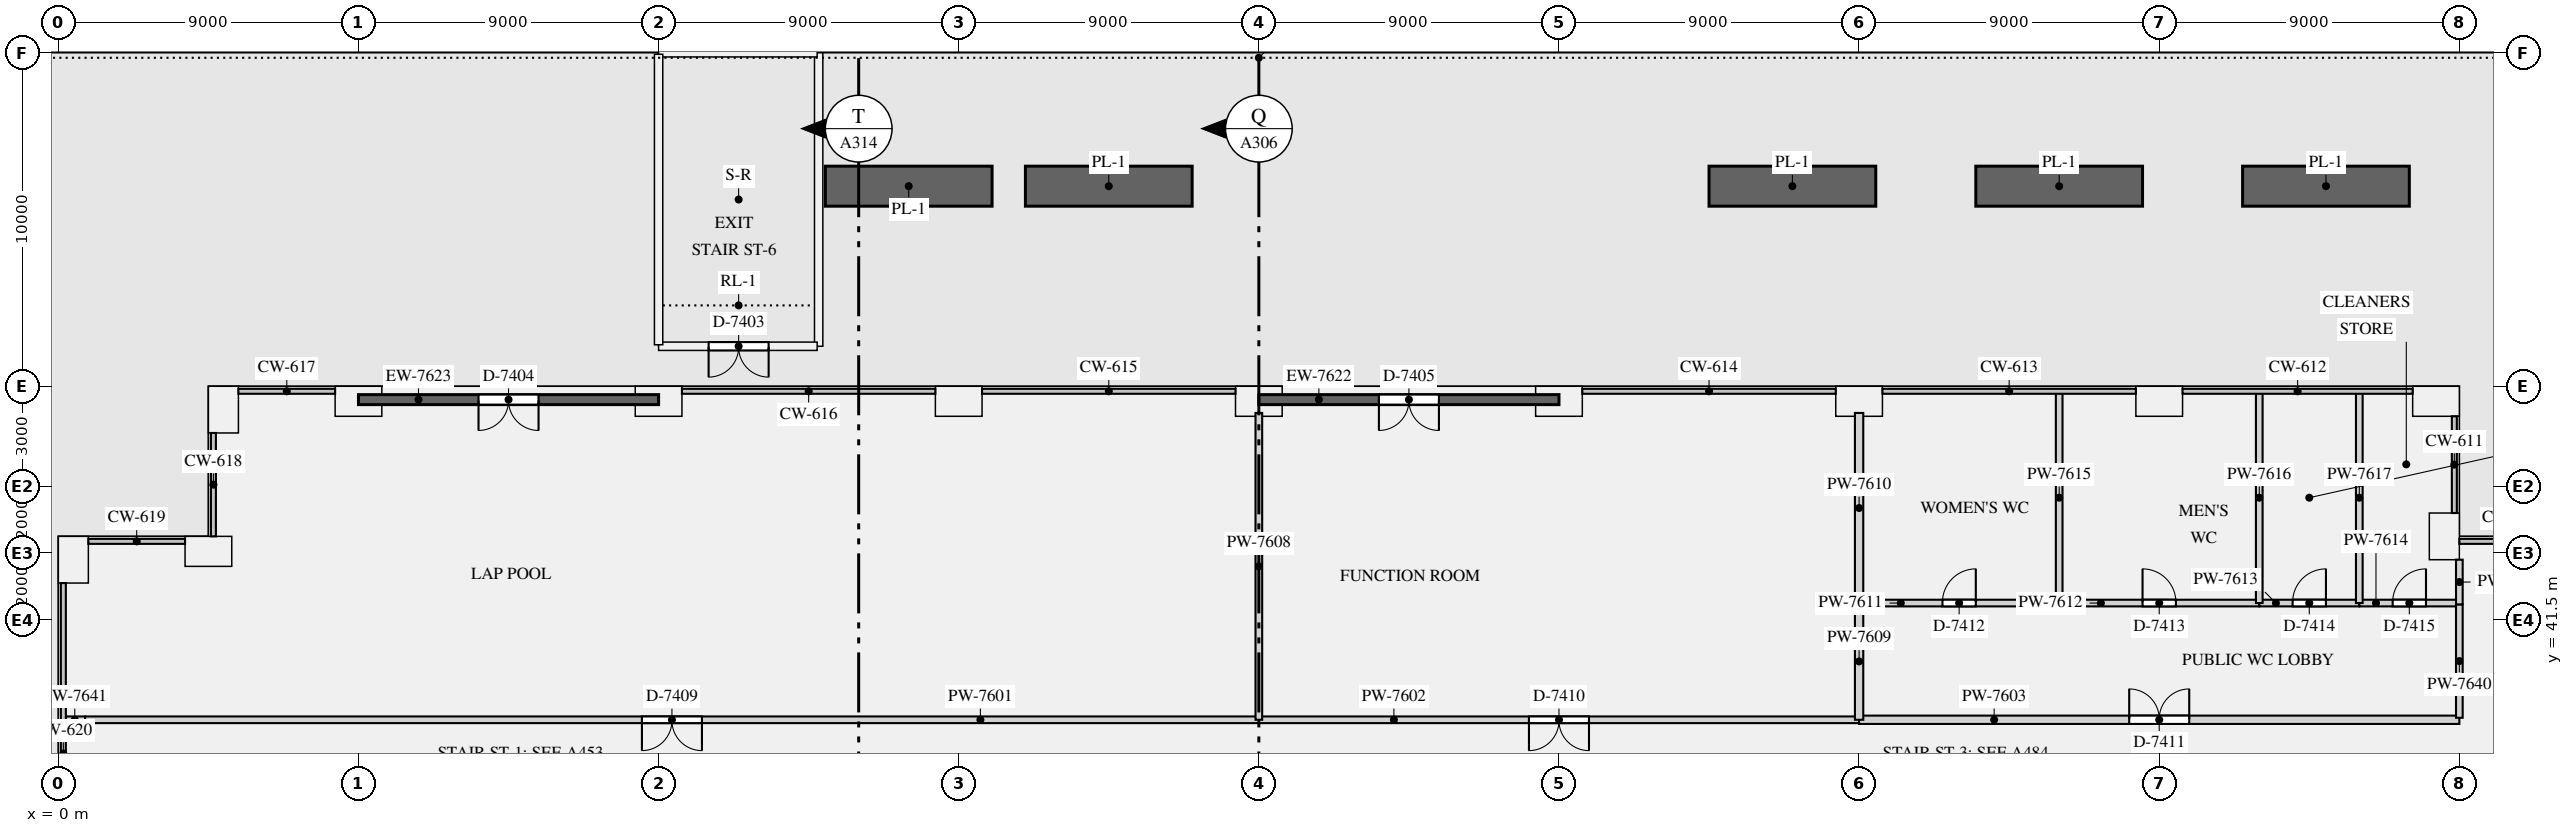
"""IFC4 building model, lengths in metres.
Left out: names, types, materials, properties, quantities, classifications, styles, units other than length and angle.
Written with IfcOpenShell. Run it as: python <this file> out.ifc"""

import sys

from ifc_helpers import new_model, si_unit, direction, frame, frame_2d, origin, origin_2d, place, context, subcontext, project, spatial, rectangle, extrude, element, fill, save


model = new_model("IFC4")
c1 = context("Model", 3, precision=1e-05, world=origin(), true_north=direction((0.0, 1.0)))
c2 = subcontext(c1, "Body", "Model", "MODEL_VIEW")
j1 = project(units=[si_unit("LENGTHUNIT", "METRE"), si_unit("PLANEANGLEUNIT", "RADIAN")], contexts=[c1])
p1 = place(None, origin())
s1 = spatial("IfcSite", under=j1, at=p1, CompositionType="ELEMENT")
p2 = place(p1, origin())
s2 = spatial("IfcBuilding", under=s1, at=p2, CompositionType="ELEMENT")
p3 = place(p2, frame((0.0, 0.0, 11.0)))
s3 = spatial("IfcBuildingStorey", under=s2, at=p3, CompositionType="ELEMENT", Elevation=11.0)
for number, where, z_axis, x_axis in (
    (1, (71.55, 44.0, 0.0), (0.0, 0.0, 1.0), (0.0, 1.0, 0.0)),
    (2, (71.3, 48.05, 0.0), (0.0, 0.0, 1.0), (-1.0, 0.0, 0.0)),
    (3, (63.0, 48.05, 0.0), (0.0, 0.0, 1.0), (-1.0, 0.0, 0.0)),
    (4, (54.0, 48.05, 0.0), (0.0, 0.0, 1.0), (-1.0, 0.0, 0.0)),
    (5, (45.0, 48.05, 0.0), (0.0, 0.0, 1.0), (-1.0, 0.0, 0.0)),
    (6, (36.0, 48.05, 0.0), (0.0, 0.0, 1.0), (-1.0, 0.0, 0.0)),
    (7, (27.0, 48.05, 0.0), (0.0, 0.0, 1.0), (-1.0, 0.0, 0.0)),
    (8, (18.0, 48.05, 0.0), (0.0, 0.0, 1.0), (-1.0, 0.0, 0.0)),
    (9, (9.0, 48.05, 0.0), (0.0, 0.0, 1.0), (-1.0, 0.0, 0.0)),
    (10, (4.95, 47.8, 0.0), (0.0, 0.0, 1.0), (0.0, -1.0, 0.0)),
    (11, (4.5, 43.55, 0.0), (0.0, 0.0, 1.0), (-1.0, 0.0, 0.0)),
    (12, (0.45, 43.3, 0.0), (0.0, 0.0, 1.0), (0.0, -1.0, 0.0)),
):
    element("IfcColumn", number, at=place(p3, frame(where, z_axis=z_axis, x_axis=x_axis)), inside=s3, PredefinedType="USERDEFINED", context=c2, shape_type="SweptSolid", body=[
        extrude(rectangle(XDim=1.4, YDim=0.9, at=origin_2d()), origin(), (0.0, 0.0, 1.0), 4.5),
    ])
p4 = place(p3, frame((0.8, 38.5, 0.0), z_axis=(0.0, 0.0, 1.0), x_axis=(1.0, 0.0, 0.0)))
e13 = element("IfcWall", 13, at=p4, inside=s3, PredefinedType="PARTITIONING", context=c2, shape_type="SweptSolid", body=[
    extrude(rectangle(XDim=35.2, YDim=0.2, at=frame_2d((17.6, 0.0))), origin(), (0.0, 0.0, 1.0), 3.9),
])
p5 = place(p4, frame((16.7, 0.0, 0.0)))
e14 = element("IfcOpeningElement", 14, at=p5, cuts=e13, PredefinedType="OPENING", context=c2, shape_type="SweptSolid", body=[
    extrude(rectangle(XDim=1.8, YDim=2.4, at=frame_2d((0.9, 1.2))), frame((0.0, 0.11, 0.0), z_axis=(0.0, -1.0, 0.0), x_axis=(1.0, 0.0, 0.0)), (0.0, 0.0, 1.0), 0.22),
])
p6 = place(p3, frame((36.0, 38.5, 0.0), z_axis=(0.0, 0.0, 1.0), x_axis=(1.0, 0.0, 0.0)))
e15 = element("IfcWall", 15, at=p6, inside=s3, PredefinedType="PARTITIONING", context=c2, shape_type="SweptSolid", body=[
    extrude(rectangle(XDim=18.0, YDim=0.2, at=frame_2d((9.0, 0.0))), origin(), (0.0, 0.0, 1.0), 3.9),
])
p7 = place(p6, frame((8.1, 0.0, 0.0)))
e16 = element("IfcOpeningElement", 16, at=p7, cuts=e15, PredefinedType="OPENING", context=c2, shape_type="SweptSolid", body=[
    extrude(rectangle(XDim=1.8, YDim=2.4, at=frame_2d((0.9, 1.2))), frame((0.0, 0.11, 0.0), z_axis=(0.0, -1.0, 0.0), x_axis=(1.0, 0.0, 0.0)), (0.0, 0.0, 1.0), 0.22),
])
p8 = place(p3, frame((54.0, 38.5, 0.0), z_axis=(0.0, 0.0, 1.0), x_axis=(1.0, 0.0, 0.0)))
e17 = element("IfcWall", 17, at=p8, inside=s3, PredefinedType="PARTITIONING", context=c2, shape_type="SweptSolid", body=[
    extrude(rectangle(XDim=18.0, YDim=0.25, at=frame_2d((9.0, 0.0))), origin(), (0.0, 0.0, 1.0), 3.9),
])
p9 = place(p8, frame((8.1, 0.0, 0.0)))
e18 = element("IfcOpeningElement", 18, at=p9, cuts=e17, PredefinedType="OPENING", context=c2, shape_type="SweptSolid", body=[
    extrude(rectangle(XDim=1.8, YDim=2.4, at=frame_2d((0.9, 1.2))), frame((0.0, 0.135, 0.0), z_axis=(0.0, -1.0, 0.0), x_axis=(1.0, 0.0, 0.0)), (0.0, 0.0, 1.0), 0.27),
])
p10 = place(p3, frame((36.0, 38.5, 0.0), z_axis=(0.0, 0.0, 1.0), x_axis=(0.0, 1.0, 0.0)))
e19 = element("IfcWall", 19, at=p10, inside=s3, PredefinedType="PARTITIONING", context=c2, shape_type="SweptSolid", body=[
    extrude(rectangle(XDim=9.2, YDim=0.2, at=frame_2d((4.6, 0.0))), origin(), (0.0, 0.0, 1.0), 3.9),
])
p11 = place(p3, frame((54.0, 38.5, 0.0), z_axis=(0.0, 0.0, 1.0), x_axis=(0.0, 1.0, 0.0)))
e20 = element("IfcWall", 20, at=p11, inside=s3, PredefinedType="PARTITIONING", context=c2, shape_type="SweptSolid", body=[
    extrude(rectangle(XDim=3.5, YDim=0.25, at=frame_2d((1.75, 0.0))), origin(), (0.0, 0.0, 1.0), 3.9),
])
p12 = place(p3, frame((54.0, 42.0, 0.0), z_axis=(0.0, 0.0, 1.0), x_axis=(0.0, 1.0, 0.0)))
e21 = element("IfcWall", 21, at=p12, inside=s3, PredefinedType="PARTITIONING", context=c2, shape_type="SweptSolid", body=[
    extrude(rectangle(XDim=5.7, YDim=0.25, at=frame_2d((2.85, 0.0))), origin(), (0.0, 0.0, 1.0), 3.9),
])
p13 = place(p3, frame((54.0, 42.0, 0.0), z_axis=(0.0, 0.0, 1.0), x_axis=(1.0, 0.0, 0.0)))
e22 = element("IfcWall", 22, at=p13, inside=s3, PredefinedType="PARTITIONING", context=c2, shape_type="SweptSolid", body=[
    extrude(rectangle(XDim=6.0, YDim=0.2, at=frame_2d((3.0, 0.0))), origin(), (0.0, 0.0, 1.0), 3.9),
])
p14 = place(p13, frame((2.5, 0.0, 0.0)))
e23 = element("IfcOpeningElement", 23, at=p14, cuts=e22, PredefinedType="OPENING", context=c2, shape_type="SweptSolid", body=[
    extrude(rectangle(XDim=1.0, YDim=2.1, at=frame_2d((0.5, 1.05))), frame((0.0, 0.11, 0.0), z_axis=(0.0, -1.0, 0.0), x_axis=(1.0, 0.0, 0.0)), (0.0, 0.0, 1.0), 0.22),
])
p15 = place(p3, frame((60.0, 42.0, 0.0), z_axis=(0.0, 0.0, 1.0), x_axis=(1.0, 0.0, 0.0)))
e24 = element("IfcWall", 24, at=p15, inside=s3, PredefinedType="PARTITIONING", context=c2, shape_type="SweptSolid", body=[
    extrude(rectangle(XDim=6.0, YDim=0.2, at=frame_2d((3.0, 0.0))), origin(), (0.0, 0.0, 1.0), 3.9),
])
p16 = place(p15, frame((2.5, 0.0, 0.0)))
e25 = element("IfcOpeningElement", 25, at=p16, cuts=e24, PredefinedType="OPENING", context=c2, shape_type="SweptSolid", body=[
    extrude(rectangle(XDim=1.0, YDim=2.1, at=frame_2d((0.5, 1.05))), frame((0.0, 0.11, 0.0), z_axis=(0.0, -1.0, 0.0), x_axis=(1.0, 0.0, 0.0)), (0.0, 0.0, 1.0), 0.22),
])
p17 = place(p3, frame((66.0, 42.0, 0.0), z_axis=(0.0, 0.0, 1.0), x_axis=(1.0, 0.0, 0.0)))
e26 = element("IfcWall", 26, at=p17, inside=s3, PredefinedType="PARTITIONING", context=c2, shape_type="SweptSolid", body=[
    extrude(rectangle(XDim=3.0, YDim=0.2, at=frame_2d((1.5, 0.0))), origin(), (0.0, 0.0, 1.0), 3.9),
])
p18 = place(p17, frame((1.0, 0.0, 0.0)))
e27 = element("IfcOpeningElement", 27, at=p18, cuts=e26, PredefinedType="OPENING", context=c2, shape_type="SweptSolid", body=[
    extrude(rectangle(XDim=1.0, YDim=2.1, at=frame_2d((0.5, 1.05))), frame((0.0, 0.11, 0.0), z_axis=(0.0, -1.0, 0.0), x_axis=(1.0, 0.0, 0.0)), (0.0, 0.0, 1.0), 0.22),
])
p19 = place(p3, frame((69.0, 42.0, 0.0), z_axis=(0.0, 0.0, 1.0), x_axis=(1.0, 0.0, 0.0)))
e28 = element("IfcWall", 28, at=p19, inside=s3, PredefinedType="PARTITIONING", context=c2, shape_type="SweptSolid", body=[
    extrude(rectangle(XDim=3.0, YDim=0.2, at=frame_2d((1.5, 0.0))), origin(), (0.0, 0.0, 1.0), 3.9),
])
p20 = place(p19, frame((1.0, 0.0, 0.0)))
e29 = element("IfcOpeningElement", 29, at=p20, cuts=e28, PredefinedType="OPENING", context=c2, shape_type="SweptSolid", body=[
    extrude(rectangle(XDim=1.0, YDim=2.1, at=frame_2d((0.5, 1.05))), frame((0.0, 0.11, 0.0), z_axis=(0.0, -1.0, 0.0), x_axis=(1.0, 0.0, 0.0)), (0.0, 0.0, 1.0), 0.22),
])
for number, where, z_axis, x_axis in (
    (30, (60.0, 42.0, 0.0), (0.0, 0.0, 1.0), (0.0, 1.0, 0.0)),
    (31, (66.0, 42.0, 0.0), (0.0, 0.0, 1.0), (0.0, 1.0, 0.0)),
    (32, (69.0, 42.0, 0.0), (0.0, 0.0, 1.0), (0.0, 1.0, 0.0)),
):
    element("IfcWall", number, at=place(p3, frame(where, z_axis=z_axis, x_axis=x_axis)), inside=s3, PredefinedType="PARTITIONING", context=c2, shape_type="SweptSolid", body=[
        extrude(rectangle(XDim=6.318, YDim=0.2, at=frame_2d((3.159, 0.0))), origin(), (0.0, 0.0, 1.0), 3.9),
    ])
p21 = place(p3, frame((36.0, 48.1, 0.0), z_axis=(0.0, 0.0, 1.0), x_axis=(1.0, 0.0, 0.0)))
e33 = element("IfcWall", 33, at=p21, inside=s3, PredefinedType="SOLIDWALL", context=c2, shape_type="SweptSolid", body=[
    extrude(rectangle(XDim=9.0, YDim=0.3, at=frame_2d((4.5, 0.0))), origin(), (0.0, 0.0, 1.0), 3.9),
])
p22 = place(p21, frame((3.6, 0.0, 0.0)))
e34 = element("IfcOpeningElement", 34, at=p22, cuts=e33, PredefinedType="OPENING", context=c2, shape_type="SweptSolid", body=[
    extrude(rectangle(XDim=1.8, YDim=2.4, at=frame_2d((0.9, 1.2))), frame((0.0, 0.16, 0.0), z_axis=(0.0, -1.0, 0.0), x_axis=(1.0, 0.0, 0.0)), (0.0, 0.0, 1.0), 0.32),
])
p23 = place(p3, frame((9.0, 48.1, 0.0), z_axis=(0.0, 0.0, 1.0), x_axis=(1.0, 0.0, 0.0)))
e35 = element("IfcWall", 35, at=p23, inside=s3, PredefinedType="SOLIDWALL", context=c2, shape_type="SweptSolid", body=[
    extrude(rectangle(XDim=9.0, YDim=0.3, at=frame_2d((4.5, 0.0))), origin(), (0.0, 0.0, 1.0), 3.9),
])
p24 = place(p23, frame((3.6, 0.0, 0.0)))
e36 = element("IfcOpeningElement", 36, at=p24, cuts=e35, PredefinedType="OPENING", context=c2, shape_type="SweptSolid", body=[
    extrude(rectangle(XDim=1.8, YDim=2.4, at=frame_2d((0.9, 1.2))), frame((0.0, 0.16, 0.0), z_axis=(0.0, -1.0, 0.0), x_axis=(1.0, 0.0, 0.0)), (0.0, 0.0, 1.0), 0.32),
])
p25 = place(p3, frame((22.8, 49.7, 0.0), z_axis=(0.0, 0.0, 1.0), x_axis=(0.0, 1.0, 0.0)))
e37 = element("IfcWall", 37, at=p25, inside=s3, PredefinedType="SOLIDWALL", context=c2, shape_type="SweptSolid", body=[
    extrude(rectangle(XDim=8.8, YDim=0.25, at=frame_2d((4.4, 0.0))), origin(), (0.0, 0.0, 1.0), 3.9),
])
p26 = place(p3, frame((18.0, 58.5, 0.0), z_axis=(0.0, 0.0, 1.0), x_axis=(1.0, 0.0, 0.0)))
e38 = element("IfcWall", 38, at=p26, inside=s3, PredefinedType="SOLIDWALL", context=c2, shape_type="SweptSolid", body=[
    extrude(rectangle(XDim=4.755, YDim=0.25, at=frame_2d((2.377, 0.0))), origin(), (0.0, 0.0, 1.0), 3.9),
])
p27 = place(p3, frame((18.0, 49.7, 0.0), z_axis=(0.0, 0.0, 1.0), x_axis=(1.0, 0.0, 0.0)))
e39 = element("IfcWall", 39, at=p27, inside=s3, PredefinedType="SOLIDWALL", context=c2, shape_type="SweptSolid", body=[
    extrude(rectangle(XDim=4.755, YDim=0.25, at=frame_2d((2.377, 0.0))), origin(), (0.0, 0.0, 1.0), 3.9),
])
p28 = place(p27, frame((1.5, 0.0, 0.0)))
e40 = element("IfcOpeningElement", 40, at=p28, cuts=e39, PredefinedType="OPENING", context=c2, shape_type="SweptSolid", body=[
    extrude(rectangle(XDim=1.8, YDim=2.4, at=frame_2d((0.9, 1.2))), frame((0.0, 0.135, 0.0), z_axis=(0.0, -1.0, 0.0), x_axis=(1.0, 0.0, 0.0)), (0.0, 0.0, 1.0), 0.27),
])
p29 = place(p3, frame((18.0, 49.745, 0.0), z_axis=(0.0, 0.0, 1.0), x_axis=(0.0, 1.0, 0.0)))
e41 = element("IfcWall", 41, at=p29, inside=s3, PredefinedType="SOLIDWALL", context=c2, shape_type="SweptSolid", body=[
    extrude(rectangle(XDim=8.71, YDim=0.25, at=frame_2d((4.355, 0.0))), origin(), (0.0, 0.0, 1.0), 3.9),
])
p30 = place(p3, frame((72.0, 38.56, 0.0), z_axis=(0.0, 0.0, 1.0), x_axis=(0.0, 1.0, 0.0)))
e42 = element("IfcWall", 42, at=p30, inside=s3, PredefinedType="PARTITIONING", context=c2, shape_type="SweptSolid", body=[
    extrude(rectangle(XDim=3.4, YDim=0.2, at=frame_2d((1.7, 0.0))), origin(), (0.0, 0.0, 1.0), 3.9),
])
p31 = place(p3, frame((0.185, 38.5, 0.0), z_axis=(0.0, 0.0, 1.0), x_axis=(1.0, 0.0, 0.0)))
e43 = element("IfcWall", 43, at=p31, inside=s3, PredefinedType="PARTITIONING", context=c2, shape_type="SweptSolid", body=[
    extrude(rectangle(XDim=0.615, YDim=0.2, at=frame_2d((0.308, 0.0))), origin(), (0.0, 0.0, 1.0), 3.9),
])
p32 = place(p3, frame((72.0, 41.96, 0.0), z_axis=(0.0, 0.0, 1.0), x_axis=(0.0, 1.0, 0.0)))
e44 = element("IfcWall", 44, at=p32, inside=s3, PredefinedType="PARTITIONING", context=c2, shape_type="SweptSolid", body=[
    extrude(rectangle(XDim=1.34, YDim=0.2, at=frame_2d((0.67, 0.0))), origin(), (0.0, 0.0, 1.0), 3.9),
])
for number, where, z_axis, x_axis in (
    (45, (23.0, 54.5, 0.0), (0.0, 0.0, 1.0), (1.0, 0.0, 0.0)),
    (46, (29.0, 54.5, 0.0), (0.0, 0.0, 1.0), (1.0, 0.0, 0.0)),
    (47, (49.5, 54.5, 0.0), (0.0, 0.0, 1.0), (1.0, 0.0, 0.0)),
    (48, (57.5, 54.5, 0.0), (0.0, 0.0, 1.0), (1.0, 0.0, 0.0)),
    (49, (65.5, 54.5, 0.0), (0.0, 0.0, 1.0), (1.0, 0.0, 0.0)),
):
    element("IfcWall", number, at=place(p3, frame(where, z_axis=z_axis, x_axis=x_axis)), inside=s3, PredefinedType="USERDEFINED", context=c2, shape_type="SweptSolid", body=[
        extrude(rectangle(XDim=5.0, YDim=1.2, at=frame_2d((2.5, 0.0))), origin(), (0.0, 0.0, 1.0), 0.6),
    ])
p33 = place(p28, frame((1.8, 0.0, 0.0), z_axis=(0.0, 0.0, 1.0), x_axis=(-1.0, 0.0, 0.0)))
e50 = element("IfcDoor", 50, at=p33, inside=s3, OperationType="DOUBLE_DOOR_SINGLE_SWING", PredefinedType="DOOR", context=c2, shape_type="SweptSolid", body=[
    extrude(rectangle(XDim=1.8, YDim=2.4, at=frame_2d((0.9, 1.2))), frame((0.0, 0.025, 0.0), z_axis=(0.0, -1.0, 0.0), x_axis=(1.0, 0.0, 0.0)), (0.0, 0.0, 1.0), 0.05),
])
fill(e40, e50)
p34 = place(p24, frame((1.8, 0.0, 0.0), z_axis=(0.0, 0.0, 1.0), x_axis=(-1.0, 0.0, 0.0)))
e51 = element("IfcDoor", 51, at=p34, inside=s3, OperationType="DOUBLE_DOOR_SINGLE_SWING", PredefinedType="DOOR", context=c2, shape_type="SweptSolid", body=[
    extrude(rectangle(XDim=1.8, YDim=2.4, at=frame_2d((0.9, 1.2))), frame((0.0, 0.025, 0.0), z_axis=(0.0, -1.0, 0.0), x_axis=(1.0, 0.0, 0.0)), (0.0, 0.0, 1.0), 0.05),
])
fill(e36, e51)
p35 = place(p22, frame((1.8, 0.0, 0.0), z_axis=(0.0, 0.0, 1.0), x_axis=(-1.0, 0.0, 0.0)))
e52 = element("IfcDoor", 52, at=p35, inside=s3, OperationType="DOUBLE_DOOR_SINGLE_SWING", PredefinedType="DOOR", context=c2, shape_type="SweptSolid", body=[
    extrude(rectangle(XDim=1.8, YDim=2.4, at=frame_2d((0.9, 1.2))), frame((0.0, 0.025, 0.0), z_axis=(0.0, -1.0, 0.0), x_axis=(1.0, 0.0, 0.0)), (0.0, 0.0, 1.0), 0.05),
])
fill(e34, e52)
p36 = place(p5, frame((1.8, 0.0, 0.0), z_axis=(0.0, 0.0, 1.0), x_axis=(-1.0, 0.0, 0.0)))
e53 = element("IfcDoor", 53, at=p36, inside=s3, OperationType="DOUBLE_DOOR_SINGLE_SWING", PredefinedType="DOOR", context=c2, shape_type="SweptSolid", body=[
    extrude(rectangle(XDim=1.8, YDim=2.4, at=frame_2d((0.9, 1.2))), frame((0.0, 0.025, 0.0), z_axis=(0.0, -1.0, 0.0), x_axis=(1.0, 0.0, 0.0)), (0.0, 0.0, 1.0), 0.05),
])
fill(e14, e53)
p37 = place(p7, frame((1.8, 0.0, 0.0), z_axis=(0.0, 0.0, 1.0), x_axis=(-1.0, 0.0, 0.0)))
e54 = element("IfcDoor", 54, at=p37, inside=s3, OperationType="DOUBLE_DOOR_SINGLE_SWING", PredefinedType="DOOR", context=c2, shape_type="SweptSolid", body=[
    extrude(rectangle(XDim=1.8, YDim=2.4, at=frame_2d((0.9, 1.2))), frame((0.0, 0.025, 0.0), z_axis=(0.0, -1.0, 0.0), x_axis=(1.0, 0.0, 0.0)), (0.0, 0.0, 1.0), 0.05),
])
fill(e16, e54)
p38 = place(p9, origin())
e55 = element("IfcDoor", 55, at=p38, inside=s3, OperationType="DOUBLE_DOOR_SINGLE_SWING", PredefinedType="DOOR", context=c2, shape_type="SweptSolid", body=[
    extrude(rectangle(XDim=1.8, YDim=2.4, at=frame_2d((0.9, 1.2))), frame((0.0, 0.025, 0.0), z_axis=(0.0, -1.0, 0.0), x_axis=(1.0, 0.0, 0.0)), (0.0, 0.0, 1.0), 0.05),
])
fill(e18, e55)
p39 = place(p14, origin())
e56 = element("IfcDoor", 56, at=p39, inside=s3, OperationType="SINGLE_SWING_RIGHT", PredefinedType="DOOR", context=c2, shape_type="SweptSolid", body=[
    extrude(rectangle(XDim=1.0, YDim=2.1, at=frame_2d((0.5, 1.05))), frame((0.0, 0.025, 0.0), z_axis=(0.0, -1.0, 0.0), x_axis=(1.0, 0.0, 0.0)), (0.0, 0.0, 1.0), 0.05),
])
fill(e23, e56)
p40 = place(p16, origin())
e57 = element("IfcDoor", 57, at=p40, inside=s3, OperationType="SINGLE_SWING_LEFT", PredefinedType="DOOR", context=c2, shape_type="SweptSolid", body=[
    extrude(rectangle(XDim=1.0, YDim=2.1, at=frame_2d((0.5, 1.05))), frame((0.0, 0.025, 0.0), z_axis=(0.0, -1.0, 0.0), x_axis=(1.0, 0.0, 0.0)), (0.0, 0.0, 1.0), 0.05),
])
fill(e25, e57)
p41 = place(p18, origin())
e58 = element("IfcDoor", 58, at=p41, inside=s3, OperationType="SINGLE_SWING_RIGHT", PredefinedType="DOOR", context=c2, shape_type="SweptSolid", body=[
    extrude(rectangle(XDim=1.0, YDim=2.1, at=frame_2d((0.5, 1.05))), frame((0.0, 0.025, 0.0), z_axis=(0.0, -1.0, 0.0), x_axis=(1.0, 0.0, 0.0)), (0.0, 0.0, 1.0), 0.05),
])
fill(e27, e58)
p42 = place(p20, origin())
e59 = element("IfcDoor", 59, at=p42, inside=s3, OperationType="SINGLE_SWING_RIGHT", PredefinedType="DOOR", context=c2, shape_type="SweptSolid", body=[
    extrude(rectangle(XDim=1.0, YDim=2.1, at=frame_2d((0.5, 1.05))), frame((0.0, 0.025, 0.0), z_axis=(0.0, -1.0, 0.0), x_axis=(1.0, 0.0, 0.0)), (0.0, 0.0, 1.0), 0.05),
])
fill(e29, e59)
save(model, sys.argv[1])
